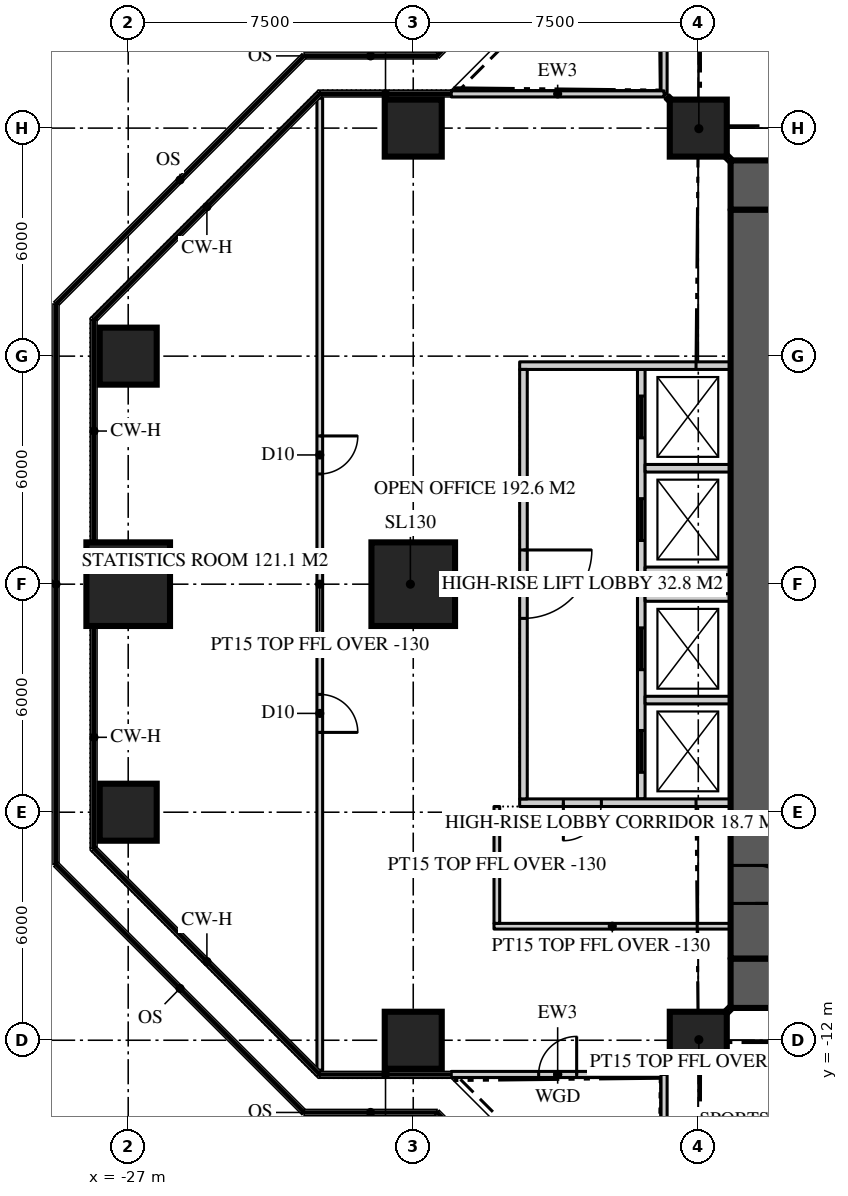
"""IFC4 building model, lengths in metres.
Left out: names, types, materials, properties, quantities, classifications, styles, units other than length and angle.
Written with IfcOpenShell. Run it as: python <this file> out.ifc"""

import sys

from ifc_helpers import new_model, si_unit, direction, frame, frame_2d, origin, origin_2d, place, context, subcontext, project, spatial, rectangle, extrude, element, fill, save


model = new_model("IFC4")
c1 = context("Model", 3, precision=1e-05, world=origin(), true_north=direction((0.0, 1.0)))
c2 = subcontext(c1, "Body", "Model", "MODEL_VIEW")
j1 = project(units=[si_unit("LENGTHUNIT", "METRE"), si_unit("PLANEANGLEUNIT", "RADIAN")], contexts=[c1])
p1 = place(None, origin())
s1 = spatial("IfcSite", under=j1, at=p1, CompositionType="ELEMENT")
p2 = place(p1, origin())
s2 = spatial("IfcBuilding", under=s1, at=p2, CompositionType="ELEMENT")
p3 = place(p2, frame((0.0, 0.0, 224.4)))
s3 = spatial("IfcBuildingStorey", under=s2, at=p3, CompositionType="ELEMENT", Elevation=224.4)
p4 = place(p3, frame((-11.15, 10.5, 0.0), z_axis=(0.0, 0.0, 1.0), x_axis=(1.0, 0.0, 0.0)))
e1 = element("IfcWall", 1, at=p4, inside=s3, PredefinedType="SHEAR", context=c2, shape_type="SweptSolid", body=[
    extrude(rectangle(XDim=22.3, YDim=1.3, at=frame_2d((11.15, 0.0))), origin(), (0.0, 0.0, 1.0), 3.9),
])
p5 = place(p4, frame((4.25, 0.0, 0.0)))
e2 = element("IfcOpeningElement", 2, at=p5, cuts=e1, PredefinedType="OPENING", context=c2, shape_type="SweptSolid", body=[
    extrude(rectangle(XDim=1.8, YDim=2.2, at=frame_2d((0.9, 1.1))), frame((0.0, 0.66, 0.0), z_axis=(0.0, -1.0, 0.0), x_axis=(1.0, 0.0, 0.0)), (0.0, 0.0, 1.0), 1.32),
])
p6 = place(p4, frame((16.25, 0.0, 0.0)))
e3 = element("IfcOpeningElement", 3, at=p6, cuts=e1, PredefinedType="OPENING", context=c2, shape_type="SweptSolid", body=[
    extrude(rectangle(XDim=1.8, YDim=2.2, at=frame_2d((0.9, 1.1))), frame((0.0, 0.66, 0.0), z_axis=(0.0, -1.0, 0.0), x_axis=(1.0, 0.0, 0.0)), (0.0, 0.0, 1.0), 1.32),
])
p7 = place(p3, frame((11.15, -10.5, 0.0), z_axis=(0.0, 0.0, 1.0), x_axis=(-1.0, 0.0, 0.0)))
e4 = element("IfcWall", 4, at=p7, inside=s3, PredefinedType="SHEAR", context=c2, shape_type="SweptSolid", body=[
    extrude(rectangle(XDim=22.3, YDim=1.3, at=frame_2d((11.15, 0.0))), origin(), (0.0, 0.0, 1.0), 3.9),
])
p8 = place(p7, frame((16.25, 0.0, 0.0)))
e5 = element("IfcOpeningElement", 5, at=p8, cuts=e4, PredefinedType="OPENING", context=c2, shape_type="SweptSolid", body=[
    extrude(rectangle(XDim=1.8, YDim=2.2, at=frame_2d((0.9, 1.1))), frame((0.0, 0.66, 0.0), z_axis=(0.0, -1.0, 0.0), x_axis=(1.0, 0.0, 0.0)), (0.0, 0.0, 1.0), 1.32),
])
p9 = place(p7, frame((4.25, 0.0, 0.0)))
e6 = element("IfcOpeningElement", 6, at=p9, cuts=e4, PredefinedType="OPENING", context=c2, shape_type="SweptSolid", body=[
    extrude(rectangle(XDim=1.8, YDim=2.2, at=frame_2d((0.9, 1.1))), frame((0.0, 0.66, 0.0), z_axis=(0.0, -1.0, 0.0), x_axis=(1.0, 0.0, 0.0)), (0.0, 0.0, 1.0), 1.32),
])
p10 = place(p3, frame((-10.5, 9.85, 0.0), z_axis=(0.0, 0.0, 1.0), x_axis=(0.0, -1.0, 0.0)))
e7 = element("IfcWall", 7, at=p10, inside=s3, PredefinedType="SHEAR", context=c2, shape_type="SweptSolid", body=[
    extrude(rectangle(XDim=19.7, YDim=1.3, at=frame_2d((9.85, 0.0))), origin(), (0.0, 0.0, 1.0), 3.9),
])
p11 = place(p10, frame((17.25, 0.0, 0.0)))
e8 = element("IfcOpeningElement", 8, at=p11, cuts=e7, PredefinedType="OPENING", context=c2, shape_type="SweptSolid", body=[
    extrude(rectangle(XDim=1.0, YDim=2.2, at=frame_2d((0.5, 1.1))), frame((0.0, 0.66, 0.0), z_axis=(0.0, -1.0, 0.0), x_axis=(1.0, 0.0, 0.0)), (0.0, 0.0, 1.0), 1.32),
])
for number, where, z_axis, x_axis in (
    (9, (-19.5, -12.0, 0.0), (0.0, 0.0, 1.0), (1.0, 0.0, 0.0)),
    (10, (-12.0, -12.0, 0.0), (0.0, 0.0, 1.0), (1.0, 0.0, 0.0)),
    (11, (-27.0, -6.0, 0.0), (0.0, 0.0, 1.0), (1.0, 0.0, 0.0)),
):
    element("IfcColumn", number, at=place(p3, frame(where, z_axis=z_axis, x_axis=x_axis)), inside=s3, PredefinedType="COLUMN", context=c2, shape_type="SweptSolid", body=[
        extrude(rectangle(XDim=1.5, YDim=1.5, at=origin_2d()), origin(), (0.0, 0.0, 1.0), 3.9),
    ])
for number, where, z_axis, x_axis in (
    (12, (-27.0, 0.0, 0.0), (0.0, 0.0, 1.0), (1.0, 0.0, 0.0)),
    (13, (-19.5, 0.0, 0.0), (0.0, 0.0, 1.0), (1.0, 0.0, 0.0)),
):
    element("IfcColumn", number, at=place(p3, frame(where, z_axis=z_axis, x_axis=x_axis)), inside=s3, PredefinedType="COLUMN", context=c2, shape_type="SweptSolid", body=[
        extrude(rectangle(XDim=2.2, YDim=2.2, at=origin_2d()), origin(), (0.0, 0.0, 1.0), 3.9),
    ])
for number, where, z_axis, x_axis in (
    (14, (-27.0, 6.0, 0.0), (0.0, 0.0, 1.0), (1.0, 0.0, 0.0)),
    (15, (-19.5, 12.0, 0.0), (0.0, 0.0, 1.0), (1.0, 0.0, 0.0)),
    (16, (-12.0, 12.0, 0.0), (0.0, 0.0, 1.0), (1.0, 0.0, 0.0)),
):
    element("IfcColumn", number, at=place(p3, frame(where, z_axis=z_axis, x_axis=x_axis)), inside=s3, PredefinedType="COLUMN", context=c2, shape_type="SweptSolid", body=[
        extrude(rectangle(XDim=1.5, YDim=1.5, at=origin_2d()), origin(), (0.0, 0.0, 1.0), 3.9),
    ])
p12 = place(p3, frame((-12.9, 18.5, 0.0), z_axis=(0.0, 0.0, 1.0), x_axis=(0.0, -1.0, 0.0)))
e17 = element("IfcWall", 17, at=p12, inside=s3, PredefinedType="SOLIDWALL", context=c2, shape_type="SweptSolid", body=[
    extrude(rectangle(XDim=5.6, YDim=0.16, at=frame_2d((2.8, 0.0))), origin(), (0.0, 0.0, 1.0), 3.77),
])
p13 = place(p12, frame((2.3, 0.0, 0.0)))
e18 = element("IfcOpeningElement", 18, at=p13, cuts=e17, PredefinedType="OPENING", context=c2, shape_type="SweptSolid", body=[
    extrude(rectangle(XDim=1.0, YDim=2.2, at=frame_2d((0.5, 1.1))), frame((0.0, 0.09, 0.0), z_axis=(0.0, -1.0, 0.0), x_axis=(1.0, 0.0, 0.0)), (0.0, 0.0, 1.0), 0.18),
])
p14 = place(p3, frame((-12.9, 12.9, 0.0), z_axis=(0.0, 0.0, 1.0), x_axis=(-1.0, 0.0, 0.0)))
e19 = element("IfcWall", 19, at=p14, inside=s3, PredefinedType="SOLIDWALL", context=c2, shape_type="SweptSolid", body=[
    extrude(rectangle(XDim=5.6, YDim=0.16, at=frame_2d((2.8, 0.0))), origin(), (0.0, 0.0, 1.0), 3.77),
])
p15 = place(p3, frame((-18.5, -12.9, 0.0), z_axis=(0.0, 0.0, 1.0), x_axis=(1.0, 0.0, 0.0)))
e20 = element("IfcWall", 20, at=p15, inside=s3, PredefinedType="SOLIDWALL", context=c2, shape_type="SweptSolid", body=[
    extrude(rectangle(XDim=5.6, YDim=0.16, at=frame_2d((2.8, 0.0))), origin(), (0.0, 0.0, 1.0), 3.77),
])
p16 = place(p15, frame((2.3, 0.0, 0.0)))
e21 = element("IfcOpeningElement", 21, at=p16, cuts=e20, PredefinedType="OPENING", context=c2, shape_type="SweptSolid", body=[
    extrude(rectangle(XDim=1.0, YDim=2.2, at=frame_2d((0.5, 1.1))), frame((0.0, 0.09, 0.0), z_axis=(0.0, -1.0, 0.0), x_axis=(1.0, 0.0, 0.0)), (0.0, 0.0, 1.0), 0.18),
])
p17 = place(p3, frame((-12.9, -12.9, 0.0), z_axis=(0.0, 0.0, 1.0), x_axis=(0.0, -1.0, 0.0)))
e22 = element("IfcWall", 22, at=p17, inside=s3, PredefinedType="SOLIDWALL", context=c2, shape_type="SweptSolid", body=[
    extrude(rectangle(XDim=5.6, YDim=0.16, at=frame_2d((2.8, 0.0))), origin(), (0.0, 0.0, 1.0), 3.77),
])
p18 = place(p3, frame((-21.959, 12.786, 0.0), z_axis=(0.0, 0.0, 1.0), x_axis=(0.0, -1.0, 0.0)))
e23 = element("IfcWall", 23, at=p18, inside=s3, PredefinedType="PARTITIONING", context=c2, shape_type="SweptSolid", body=[
    extrude(rectangle(XDim=25.573, YDim=0.15, at=frame_2d((12.786, 0.0))), origin(), (0.0, 0.0, 1.0), 3.77),
])
p19 = place(p18, frame((15.687, 0.0, 0.0)))
e24 = element("IfcOpeningElement", 24, at=p19, cuts=e23, PredefinedType="OPENING", context=c2, shape_type="SweptSolid", body=[
    extrude(rectangle(XDim=1.0, YDim=2.2, at=frame_2d((0.5, 1.1))), frame((0.0, 0.085, 0.0), z_axis=(0.0, -1.0, 0.0), x_axis=(1.0, 0.0, 0.0)), (0.0, 0.0, 1.0), 0.17),
])
p20 = place(p18, frame((8.886, 0.0, 0.0)))
e25 = element("IfcOpeningElement", 25, at=p20, cuts=e23, PredefinedType="OPENING", context=c2, shape_type="SweptSolid", body=[
    extrude(rectangle(XDim=1.0, YDim=2.2, at=frame_2d((0.5, 1.1))), frame((0.0, 0.085, 0.0), z_axis=(0.0, -1.0, 0.0), x_axis=(1.0, 0.0, 0.0)), (0.0, 0.0, 1.0), 0.17),
])
p21 = place(p3, frame((-13.5, 5.65, 0.0), z_axis=(0.0, 0.0, 1.0), x_axis=(0.0, -1.0, 0.0)))
e26 = element("IfcWall", 26, at=p21, inside=s3, PredefinedType="SOLIDWALL", context=c2, shape_type="SweptSolid", body=[
    extrude(rectangle(XDim=11.3, YDim=0.2, at=frame_2d((5.65, 0.0))), origin(), (0.0, 0.0, 1.0), 3.7),
])
p22 = place(p21, frame((0.7, 0.0, 0.0)))
e27 = element("IfcOpeningElement", 27, at=p22, cuts=e26, PredefinedType="OPENING", context=c2, shape_type="SweptSolid", body=[
    extrude(rectangle(XDim=1.1, YDim=2.2, at=frame_2d((0.55, 1.1))), frame((0.0, 0.11, 0.0), z_axis=(0.0, -1.0, 0.0), x_axis=(1.0, 0.0, 0.0)), (0.0, 0.0, 1.0), 0.22),
])
p23 = place(p21, frame((3.4, 0.0, 0.0)))
e28 = element("IfcOpeningElement", 28, at=p23, cuts=e26, PredefinedType="OPENING", context=c2, shape_type="SweptSolid", body=[
    extrude(rectangle(XDim=1.1, YDim=2.2, at=frame_2d((0.55, 1.1))), frame((0.0, 0.11, 0.0), z_axis=(0.0, -1.0, 0.0), x_axis=(1.0, 0.0, 0.0)), (0.0, 0.0, 1.0), 0.22),
])
p24 = place(p21, frame((6.8, 0.0, 0.0)))
e29 = element("IfcOpeningElement", 29, at=p24, cuts=e26, PredefinedType="OPENING", context=c2, shape_type="SweptSolid", body=[
    extrude(rectangle(XDim=1.1, YDim=2.2, at=frame_2d((0.55, 1.1))), frame((0.0, 0.11, 0.0), z_axis=(0.0, -1.0, 0.0), x_axis=(1.0, 0.0, 0.0)), (0.0, 0.0, 1.0), 0.22),
])
p25 = place(p21, frame((9.5, 0.0, 0.0)))
e30 = element("IfcOpeningElement", 30, at=p25, cuts=e26, PredefinedType="OPENING", context=c2, shape_type="SweptSolid", body=[
    extrude(rectangle(XDim=1.1, YDim=2.2, at=frame_2d((0.55, 1.1))), frame((0.0, 0.11, 0.0), z_axis=(0.0, -1.0, 0.0), x_axis=(1.0, 0.0, 0.0)), (0.0, 0.0, 1.0), 0.22),
])
p26 = place(p3, frame((-11.15, 5.75, 0.0), z_axis=(0.0, 0.0, 1.0), x_axis=(-1.0, 0.0, 0.0)))
e31 = element("IfcWall", 31, at=p26, inside=s3, PredefinedType="SOLIDWALL", context=c2, shape_type="SweptSolid", body=[
    extrude(rectangle(XDim=5.55, YDim=0.2, at=frame_2d((2.775, 0.0))), origin(), (0.0, 0.0, 1.0), 3.7),
])
p27 = place(p3, frame((-11.15, -5.75, 0.0), z_axis=(0.0, 0.0, 1.0), x_axis=(-1.0, 0.0, 0.0)))
e32 = element("IfcWall", 32, at=p27, inside=s3, PredefinedType="SOLIDWALL", context=c2, shape_type="SweptSolid", body=[
    extrude(rectangle(XDim=5.55, YDim=0.2, at=frame_2d((2.775, 0.0))), origin(), (0.0, 0.0, 1.0), 3.7),
])
p28 = place(p27, frame((3.4, 0.0, 0.0)))
e33 = element("IfcOpeningElement", 33, at=p28, cuts=e32, PredefinedType="OPENING", context=c2, shape_type="SweptSolid", body=[
    extrude(rectangle(XDim=1.0, YDim=2.2, at=frame_2d((0.5, 1.1))), frame((0.0, 0.11, 0.0), z_axis=(0.0, -1.0, 0.0), x_axis=(1.0, 0.0, 0.0)), (0.0, 0.0, 1.0), 0.22),
])
for number, where, z_axis, x_axis in (
    (34, (-11.15, 3.05, 0.0), (0.0, 0.0, 1.0), (-1.0, 0.0, 0.0)),
    (35, (-11.15, 0.35, 0.0), (0.0, 0.0, 1.0), (-1.0, 0.0, 0.0)),
    (36, (-11.15, -0.35, 0.0), (0.0, 0.0, 1.0), (-1.0, 0.0, 0.0)),
    (37, (-11.15, -3.05, 0.0), (0.0, 0.0, 1.0), (-1.0, 0.0, 0.0)),
):
    element("IfcWall", number, at=place(p3, frame(where, z_axis=z_axis, x_axis=x_axis)), inside=s3, PredefinedType="SOLIDWALL", context=c2, shape_type="SweptSolid", body=[
        extrude(rectangle(XDim=2.25, YDim=0.2, at=frame_2d((1.125, 0.0))), origin(), (0.0, 0.0, 1.0), 3.7),
    ])
p29 = place(p3, frame((-16.6, 5.65, 0.0), z_axis=(0.0, 0.0, 1.0), x_axis=(0.0, -1.0, 0.0)))
e38 = element("IfcWall", 38, at=p29, inside=s3, PredefinedType="SOLIDWALL", context=c2, shape_type="SweptSolid", body=[
    extrude(rectangle(XDim=11.3, YDim=0.2, at=frame_2d((5.65, 0.0))), origin(), (0.0, 0.0, 1.0), 3.18),
])
p30 = place(p29, frame((4.75, 0.0, 0.0)))
e39 = element("IfcOpeningElement", 39, at=p30, cuts=e38, PredefinedType="OPENING", context=c2, shape_type="SweptSolid", body=[
    extrude(rectangle(XDim=1.8, YDim=2.2, at=frame_2d((0.9, 1.1))), frame((0.0, 0.11, 0.0), z_axis=(0.0, -1.0, 0.0), x_axis=(1.0, 0.0, 0.0)), (0.0, 0.0, 1.0), 0.22),
])
for number, where, z_axis, x_axis in (
    (40, (-11.15, 11.15, 0.0), (0.0, 0.0, 1.0), (-0.707, 0.707, 0.0)),
    (41, (-11.15, -11.15, 0.0), (0.0, 0.0, 1.0), (-0.707, -0.707, 0.0)),
):
    element("IfcWall", number, at=place(p3, frame(where, z_axis=z_axis, x_axis=x_axis)), inside=s3, PredefinedType="PARTITIONING", context=c2, shape_type="SweptSolid", body=[
        extrude(rectangle(XDim=2.362, YDim=0.15, at=frame_2d((1.181, 0.0))), origin(), (0.0, 0.0, 1.0), 3.22),
    ])
p31 = place(p3, frame((-11.15, -9.0, 0.0), z_axis=(0.0, 0.0, 1.0), x_axis=(-1.0, 0.0, 0.0)))
e42 = element("IfcWall", 42, at=p31, inside=s3, PredefinedType="PARTITIONING", context=c2, shape_type="SweptSolid", body=[
    extrude(rectangle(XDim=6.225, YDim=0.15, at=frame_2d((3.113, 0.0))), origin(), (0.0, 0.0, 1.0), 3.77),
])
p32 = place(p3, frame((-17.3, -5.85, 0.0), z_axis=(0.0, 0.0, 1.0), x_axis=(0.0, -1.0, 0.0)))
e43 = element("IfcWall", 43, at=p32, inside=s3, PredefinedType="PARTITIONING", context=c2, shape_type="SweptSolid", body=[
    extrude(rectangle(XDim=3.075, YDim=0.15, at=frame_2d((1.538, 0.0))), origin(), (0.0, 0.0, 1.0), 3.77),
])
p33 = place(p16, origin())
e44 = element("IfcDoor", 44, at=p33, inside=s3, OperationType="SINGLE_SWING_RIGHT", PredefinedType="DOOR", context=c2, shape_type="SweptSolid", body=[
    extrude(rectangle(XDim=1.0, YDim=2.2, at=frame_2d((0.5, 1.1))), frame((0.0, 0.025, 0.0), z_axis=(0.0, -1.0, 0.0), x_axis=(1.0, 0.0, 0.0)), (0.0, 0.0, 1.0), 0.05),
])
fill(e21, e44)
p34 = place(p11, origin())
e45 = element("IfcDoor", 45, at=p34, inside=s3, OperationType="SINGLE_SWING_RIGHT", PredefinedType="DOOR", context=c2, shape_type="SweptSolid", body=[
    extrude(rectangle(XDim=1.0, YDim=2.2, at=frame_2d((0.5, 1.1))), frame((0.0, 0.025, 0.0), z_axis=(0.0, -1.0, 0.0), x_axis=(1.0, 0.0, 0.0)), (0.0, 0.0, 1.0), 0.05),
])
fill(e8, e45)
p35 = place(p19, origin())
e46 = element("IfcDoor", 46, at=p35, inside=s3, OperationType="SINGLE_SWING_RIGHT", PredefinedType="DOOR", context=c2, shape_type="SweptSolid", body=[
    extrude(rectangle(XDim=1.0, YDim=2.2, at=frame_2d((0.5, 1.1))), frame((0.0, 0.025, 0.0), z_axis=(0.0, -1.0, 0.0), x_axis=(1.0, 0.0, 0.0)), (0.0, 0.0, 1.0), 0.05),
])
fill(e24, e46)
p36 = place(p20, origin())
e47 = element("IfcDoor", 47, at=p36, inside=s3, OperationType="SINGLE_SWING_LEFT", PredefinedType="DOOR", context=c2, shape_type="SweptSolid", body=[
    extrude(rectangle(XDim=1.0, YDim=2.2, at=frame_2d((0.5, 1.1))), frame((0.0, 0.025, 0.0), z_axis=(0.0, -1.0, 0.0), x_axis=(1.0, 0.0, 0.0)), (0.0, 0.0, 1.0), 0.05),
])
fill(e25, e47)
p37 = place(p30, origin())
e48 = element("IfcDoor", 48, at=p37, inside=s3, OperationType="DOUBLE_DOOR_DOUBLE_SWING", PredefinedType="DOOR", context=c2, shape_type="SweptSolid", body=[
    extrude(rectangle(XDim=1.8, YDim=2.2, at=frame_2d((0.9, 1.1))), frame((0.0, 0.025, 0.0), z_axis=(0.0, -1.0, 0.0), x_axis=(1.0, 0.0, 0.0)), (0.0, 0.0, 1.0), 0.05),
])
fill(e39, e48)
p38 = place(p22, origin())
e49 = element("IfcDoor", 49, at=p38, inside=s3, OperationType="SLIDING_TO_LEFT", PredefinedType="DOOR", context=c2, shape_type="SweptSolid", body=[
    extrude(rectangle(XDim=1.1, YDim=2.2, at=frame_2d((0.55, 1.1))), frame((0.0, 0.025, 0.0), z_axis=(0.0, -1.0, 0.0), x_axis=(1.0, 0.0, 0.0)), (0.0, 0.0, 1.0), 0.05),
])
fill(e27, e49)
p39 = place(p23, origin())
e50 = element("IfcDoor", 50, at=p39, inside=s3, OperationType="SLIDING_TO_LEFT", PredefinedType="DOOR", context=c2, shape_type="SweptSolid", body=[
    extrude(rectangle(XDim=1.1, YDim=2.2, at=frame_2d((0.55, 1.1))), frame((0.0, 0.025, 0.0), z_axis=(0.0, -1.0, 0.0), x_axis=(1.0, 0.0, 0.0)), (0.0, 0.0, 1.0), 0.05),
])
fill(e28, e50)
p40 = place(p24, origin())
e51 = element("IfcDoor", 51, at=p40, inside=s3, OperationType="SLIDING_TO_LEFT", PredefinedType="DOOR", context=c2, shape_type="SweptSolid", body=[
    extrude(rectangle(XDim=1.1, YDim=2.2, at=frame_2d((0.55, 1.1))), frame((0.0, 0.025, 0.0), z_axis=(0.0, -1.0, 0.0), x_axis=(1.0, 0.0, 0.0)), (0.0, 0.0, 1.0), 0.05),
])
fill(e29, e51)
p41 = place(p25, origin())
e52 = element("IfcDoor", 52, at=p41, inside=s3, OperationType="SLIDING_TO_LEFT", PredefinedType="DOOR", context=c2, shape_type="SweptSolid", body=[
    extrude(rectangle(XDim=1.1, YDim=2.2, at=frame_2d((0.55, 1.1))), frame((0.0, 0.025, 0.0), z_axis=(0.0, -1.0, 0.0), x_axis=(1.0, 0.0, 0.0)), (0.0, 0.0, 1.0), 0.05),
])
fill(e30, e52)
p42 = place(p28, origin())
e53 = element("IfcDoor", 53, at=p42, inside=s3, OperationType="SINGLE_SWING_RIGHT", PredefinedType="DOOR", context=c2, shape_type="SweptSolid", body=[
    extrude(rectangle(XDim=1.0, YDim=2.2, at=frame_2d((0.5, 1.1))), frame((0.0, 0.025, 0.0), z_axis=(0.0, -1.0, 0.0), x_axis=(1.0, 0.0, 0.0)), (0.0, 0.0, 1.0), 0.05),
])
fill(e33, e53)
save(model, sys.argv[1])
